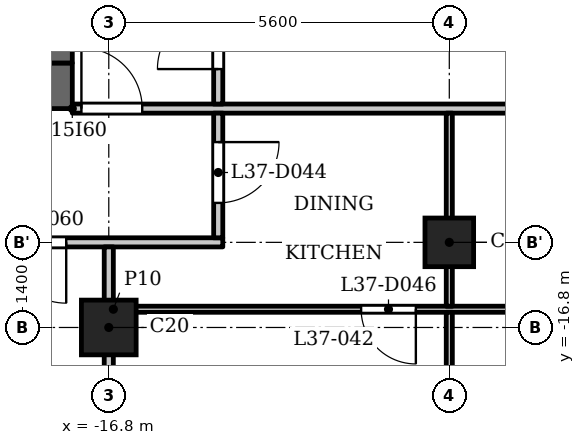
"""IFC4 building model, lengths in metres.
Left out: names, types, materials, properties, quantities, classifications, styles, units other than length and angle.
Written with IfcOpenShell. Run it as: python <this file> out.ifc"""

import sys

from ifc_helpers import new_model, si_unit, direction, frame, frame_2d, origin, origin_2d, place, context, subcontext, project, spatial, rectangle, extrude, element, fill, save


model = new_model("IFC4")
c1 = context("Model", 3, precision=1e-05, world=origin(), true_north=direction((0.0, 1.0)))
c2 = subcontext(c1, "Body", "Model", "MODEL_VIEW")
j1 = project(units=[si_unit("LENGTHUNIT", "METRE"), si_unit("PLANEANGLEUNIT", "RADIAN")], contexts=[c1])
p1 = place(None, origin())
s1 = spatial("IfcSite", under=j1, at=p1, CompositionType="ELEMENT")
p2 = place(p1, origin())
s2 = spatial("IfcBuilding", under=s1, at=p2, CompositionType="ELEMENT")
p3 = place(p2, frame((0.0, 0.0, 146.6)))
s3 = spatial("IfcBuildingStorey", under=s2, at=p3, CompositionType="ELEMENT", Elevation=146.6)
p4 = place(p3, frame((-16.8, -16.8, 0.0), z_axis=(0.0, 0.0, 1.0), x_axis=(1.0, 0.0, 0.0)))
e1 = element("IfcColumn", 1, at=p4, inside=s3, PredefinedType="COLUMN", context=c2, shape_type="SweptSolid", body=[
    extrude(rectangle(XDim=0.9, YDim=0.9, at=origin_2d()), origin(), (0.0, 0.0, 1.0), 3.5),
])
p5 = place(p3, frame((-11.2, -15.4, 0.0), z_axis=(0.0, 0.0, 1.0), x_axis=(1.0, 0.0, 0.0)))
e2 = element("IfcColumn", 2, at=p5, inside=s3, PredefinedType="COLUMN", context=c2, shape_type="SweptSolid", body=[
    extrude(rectangle(XDim=0.8, YDim=0.8, at=origin_2d()), origin(), (0.0, 0.0, 1.0), 3.5),
])
p6 = place(p3, frame((-17.4, -12.825, 0.0), z_axis=(0.0, 0.0, 1.0), x_axis=(-1.0, 0.0, 0.0)))
e3 = element("IfcWall", 3, at=p6, inside=s3, PredefinedType="SHEAR", context=c2, shape_type="SweptSolid", body=[
    extrude(rectangle(XDim=10.4, YDim=0.75, at=frame_2d((5.2, 0.0))), origin(), (0.0, 0.0, 1.0), 3.2),
])
p7 = place(p3, frame((-17.6, -12.45, 0.0), z_axis=(0.0, 0.0, 1.0), x_axis=(0.0, 1.0, 0.0)))
e4 = element("IfcWall", 4, at=p7, inside=s3, PredefinedType="SHEAR", context=c2, shape_type="SweptSolid", body=[
    extrude(rectangle(XDim=24.9, YDim=0.4, at=frame_2d((12.45, 0.0))), origin(), (0.0, 0.0, 1.0), 3.2),
])
p8 = place(p7, frame((6.325, 0.0, 0.0)))
e5 = element("IfcOpeningElement", 5, at=p8, cuts=e4, PredefinedType="OPENING", context=c2, shape_type="SweptSolid", body=[
    extrude(rectangle(XDim=0.9, YDim=2.1, at=frame_2d((0.45, 1.05))), frame((0.0, 0.21, 0.0), z_axis=(0.0, -1.0, 0.0), x_axis=(1.0, 0.0, 0.0)), (0.0, 0.0, 1.0), 0.42),
])
p9 = place(p7, frame((9.925, 0.0, 0.0)))
e6 = element("IfcOpeningElement", 6, at=p9, cuts=e4, PredefinedType="OPENING", context=c2, shape_type="SweptSolid", body=[
    extrude(rectangle(XDim=0.9, YDim=2.1, at=frame_2d((0.45, 1.05))), frame((0.0, 0.21, 0.0), z_axis=(0.0, -1.0, 0.0), x_axis=(1.0, 0.0, 0.0)), (0.0, 0.0, 1.0), 0.42),
])
p10 = place(p7, frame((15.6, 0.0, 0.0)))
e7 = element("IfcOpeningElement", 7, at=p10, cuts=e4, PredefinedType="OPENING", context=c2, shape_type="SweptSolid", body=[
    extrude(rectangle(XDim=1.1, YDim=2.1, at=frame_2d((0.55, 1.05))), frame((0.0, 0.21, 0.0), z_axis=(0.0, -1.0, 0.0), x_axis=(1.0, 0.0, 0.0)), (0.0, 0.0, 1.0), 0.42),
])
p11 = place(p7, frame((18.0, 0.0, 0.0)))
e8 = element("IfcOpeningElement", 8, at=p11, cuts=e4, PredefinedType="OPENING", context=c2, shape_type="SweptSolid", body=[
    extrude(rectangle(XDim=1.1, YDim=2.1, at=frame_2d((0.55, 1.05))), frame((0.0, 0.21, 0.0), z_axis=(0.0, -1.0, 0.0), x_axis=(1.0, 0.0, 0.0)), (0.0, 0.0, 1.0), 0.42),
])
p12 = place(p7, frame((23.025, 0.0, 0.0)))
e9 = element("IfcOpeningElement", 9, at=p12, cuts=e4, PredefinedType="OPENING", context=c2, shape_type="SweptSolid", body=[
    extrude(rectangle(XDim=1.1, YDim=2.1, at=frame_2d((0.55, 1.05))), frame((0.0, 0.21, 0.0), z_axis=(0.0, -1.0, 0.0), x_axis=(1.0, 0.0, 0.0)), (0.0, 0.0, 1.0), 0.42),
])
p13 = place(p7, frame((0.775, 0.0, 0.0)))
e10 = element("IfcOpeningElement", 10, at=p13, cuts=e4, PredefinedType="OPENING", context=c2, shape_type="SweptSolid", body=[
    extrude(rectangle(XDim=1.1, YDim=2.1, at=frame_2d((0.55, 1.05))), frame((0.0, 0.21, 0.0), z_axis=(0.0, -1.0, 0.0), x_axis=(1.0, 0.0, 0.0)), (0.0, 0.0, 1.0), 0.42),
])
p14 = place(p7, frame((12.925, 0.0, 0.0)))
e11 = element("IfcOpeningElement", 11, at=p14, cuts=e4, PredefinedType="OPENING", context=c2, shape_type="SweptSolid", body=[
    extrude(rectangle(XDim=1.8, YDim=2.1, at=frame_2d((0.9, 1.05))), frame((0.0, 0.21, 0.0), z_axis=(0.0, -1.0, 0.0), x_axis=(1.0, 0.0, 0.0)), (0.0, 0.0, 1.0), 0.42),
])
p15 = place(p3, frame((-16.725, -16.5, 0.0), z_axis=(0.0, 0.0, 1.0), x_axis=(1.0, 0.0, 0.0)))
e12 = element("IfcWall", 12, at=p15, inside=s3, PredefinedType="PARTITIONING", context=c2, shape_type="SweptSolid", body=[
    extrude(rectangle(XDim=33.45, YDim=0.1, at=frame_2d((16.725, 0.0))), origin(), (0.0, 0.0, 1.0), 3.2),
])
p16 = place(p15, frame((9.675, 0.0, 0.0)))
e13 = element("IfcOpeningElement", 13, at=p16, cuts=e12, PredefinedType="OPENING", context=c2, shape_type="SweptSolid", body=[
    extrude(rectangle(XDim=0.8, YDim=2.1, at=frame_2d((0.4, 1.05))), frame((0.0, 0.06, 0.0), z_axis=(0.0, -1.0, 0.0), x_axis=(1.0, 0.0, 0.0)), (0.0, 0.0, 1.0), 0.12),
])
p17 = place(p15, frame((4.075, 0.0, 0.0)))
e14 = element("IfcOpeningElement", 14, at=p17, cuts=e12, PredefinedType="OPENING", context=c2, shape_type="SweptSolid", body=[
    extrude(rectangle(XDim=0.9, YDim=2.1, at=frame_2d((0.45, 1.05))), frame((0.0, 0.06, 0.0), z_axis=(0.0, -1.0, 0.0), x_axis=(1.0, 0.0, 0.0)), (0.0, 0.0, 1.0), 0.12),
])
p18 = place(p15, frame((20.875, 0.0, 0.0)))
e15 = element("IfcOpeningElement", 15, at=p18, cuts=e12, PredefinedType="OPENING", context=c2, shape_type="SweptSolid", body=[
    extrude(rectangle(XDim=0.8, YDim=2.1, at=frame_2d((0.4, 1.05))), frame((0.0, 0.06, 0.0), z_axis=(0.0, -1.0, 0.0), x_axis=(1.0, 0.0, 0.0)), (0.0, 0.0, 1.0), 0.12),
])
p19 = place(p15, frame((15.275, 0.0, 0.0)))
e16 = element("IfcOpeningElement", 16, at=p19, cuts=e12, PredefinedType="OPENING", context=c2, shape_type="SweptSolid", body=[
    extrude(rectangle(XDim=0.9, YDim=2.1, at=frame_2d((0.45, 1.05))), frame((0.0, 0.06, 0.0), z_axis=(0.0, -1.0, 0.0), x_axis=(1.0, 0.0, 0.0)), (0.0, 0.0, 1.0), 0.12),
])
p20 = place(p15, frame((26.475, 0.0, 0.0)))
e17 = element("IfcOpeningElement", 17, at=p20, cuts=e12, PredefinedType="OPENING", context=c2, shape_type="SweptSolid", body=[
    extrude(rectangle(XDim=0.8, YDim=2.1, at=frame_2d((0.4, 1.05))), frame((0.0, 0.06, 0.0), z_axis=(0.0, -1.0, 0.0), x_axis=(1.0, 0.0, 0.0)), (0.0, 0.0, 1.0), 0.12),
])
p21 = place(p15, frame((30.575, 0.0, 0.0)))
e18 = element("IfcOpeningElement", 18, at=p21, cuts=e12, PredefinedType="OPENING", context=c2, shape_type="SweptSolid", body=[
    extrude(rectangle(XDim=0.9, YDim=2.1, at=frame_2d((0.45, 1.05))), frame((0.0, 0.06, 0.0), z_axis=(0.0, -1.0, 0.0), x_axis=(1.0, 0.0, 0.0)), (0.0, 0.0, 1.0), 0.12),
])
p22 = place(p3, frame((-27.484, -15.4, 0.0), z_axis=(0.0, 0.0, 1.0), x_axis=(1.0, 0.0, 0.0)))
e19 = element("IfcWall", 19, at=p22, inside=s3, PredefinedType="PARTITIONING", context=c2, shape_type="SweptSolid", body=[
    extrude(rectangle(XDim=12.559, YDim=0.15, at=frame_2d((6.279, 0.0))), origin(), (0.0, 0.0, 1.0), 3.2),
])
p23 = place(p22, frame((8.984, 0.0, 0.0)))
e20 = element("IfcOpeningElement", 20, at=p23, cuts=e19, PredefinedType="OPENING", context=c2, shape_type="SweptSolid", body=[
    extrude(rectangle(XDim=1.0, YDim=2.1, at=frame_2d((0.5, 1.05))), frame((0.0, 0.085, 0.0), z_axis=(0.0, -1.0, 0.0), x_axis=(1.0, 0.0, 0.0)), (0.0, 0.0, 1.0), 0.17),
])
p24 = place(p3, frame((-17.4, -13.2, 0.0), z_axis=(0.0, 0.0, 1.0), x_axis=(1.0, 0.0, 0.0)))
e21 = element("IfcWall", 21, at=p24, inside=s3, PredefinedType="PARTITIONING", context=c2, shape_type="SweptSolid", body=[
    extrude(rectangle(XDim=34.8, YDim=0.15, at=frame_2d((17.4, 0.0))), origin(), (0.0, 0.0, 1.0), 3.2),
])
p25 = place(p24, frame((0.15, 0.0, 0.0)))
e22 = element("IfcOpeningElement", 22, at=p25, cuts=e21, PredefinedType="OPENING", context=c2, shape_type="SweptSolid", body=[
    extrude(rectangle(XDim=1.0, YDim=2.1, at=frame_2d((0.5, 1.05))), frame((0.0, 0.085, 0.0), z_axis=(0.0, -1.0, 0.0), x_axis=(1.0, 0.0, 0.0)), (0.0, 0.0, 1.0), 0.17),
])
p26 = place(p24, frame((33.55, 0.0, 0.0)))
e23 = element("IfcOpeningElement", 23, at=p26, cuts=e21, PredefinedType="OPENING", context=c2, shape_type="SweptSolid", body=[
    extrude(rectangle(XDim=1.0, YDim=2.1, at=frame_2d((0.5, 1.05))), frame((0.0, 0.085, 0.0), z_axis=(0.0, -1.0, 0.0), x_axis=(1.0, 0.0, 0.0)), (0.0, 0.0, 1.0), 0.17),
])
p27 = place(p24, frame((15.7, 0.0, 0.0)))
e24 = element("IfcOpeningElement", 24, at=p27, cuts=e21, PredefinedType="OPENING", context=c2, shape_type="SweptSolid", body=[
    extrude(rectangle(XDim=1.0, YDim=2.1, at=frame_2d((0.5, 1.05))), frame((0.0, 0.085, 0.0), z_axis=(0.0, -1.0, 0.0), x_axis=(1.0, 0.0, 0.0)), (0.0, 0.0, 1.0), 0.17),
])
p28 = place(p3, frame((-16.8, -22.93, 0.0), z_axis=(0.0, 0.0, 1.0), x_axis=(0.0, 1.0, 0.0)))
e25 = element("IfcWall", 25, at=p28, inside=s3, PredefinedType="PARTITIONING", context=c2, shape_type="SweptSolid", body=[
    extrude(rectangle(XDim=7.455, YDim=0.15, at=frame_2d((3.728, 0.0))), origin(), (0.0, 0.0, 1.0), 3.2),
])
p29 = place(p3, frame((-15.0, -15.325, 0.0), z_axis=(0.0, 0.0, 1.0), x_axis=(0.0, 1.0, 0.0)))
e26 = element("IfcWall", 26, at=p29, inside=s3, PredefinedType="PARTITIONING", context=c2, shape_type="SweptSolid", body=[
    extrude(rectangle(XDim=2.05, YDim=0.15, at=frame_2d((1.025, 0.0))), origin(), (0.0, 0.0, 1.0), 3.2),
])
p30 = place(p29, frame((0.574, 0.0, 0.0)))
e27 = element("IfcOpeningElement", 27, at=p30, cuts=e26, PredefinedType="OPENING", context=c2, shape_type="SweptSolid", body=[
    extrude(rectangle(XDim=1.0, YDim=2.1, at=frame_2d((0.5, 1.05))), frame((0.0, 0.085, 0.0), z_axis=(0.0, -1.0, 0.0), x_axis=(1.0, 0.0, 0.0)), (0.0, 0.0, 1.0), 0.17),
])
p31 = place(p3, frame((-15.0, -13.125, 0.0), z_axis=(0.0, 0.0, 1.0), x_axis=(0.0, 1.0, 0.0)))
e28 = element("IfcWall", 28, at=p31, inside=s3, PredefinedType="PARTITIONING", context=c2, shape_type="SweptSolid", body=[
    extrude(rectangle(XDim=6.356, YDim=0.15, at=frame_2d((3.178, 0.0))), origin(), (0.0, 0.0, 1.0), 3.2),
])
p32 = place(p31, frame((0.575, 0.0, 0.0)))
e29 = element("IfcOpeningElement", 29, at=p32, cuts=e28, PredefinedType="OPENING", context=c2, shape_type="SweptSolid", body=[
    extrude(rectangle(XDim=1.0, YDim=2.1, at=frame_2d((0.5, 1.05))), frame((0.0, 0.085, 0.0), z_axis=(0.0, -1.0, 0.0), x_axis=(1.0, 0.0, 0.0)), (0.0, 0.0, 1.0), 0.17),
])
p33 = place(p3, frame((-11.2, -22.93, 0.0), z_axis=(0.0, 0.0, 1.0), x_axis=(0.0, 1.0, 0.0)))
e30 = element("IfcWall", 30, at=p33, inside=s3, PredefinedType="PARTITIONING", context=c2, shape_type="SweptSolid", body=[
    extrude(rectangle(XDim=6.38, YDim=0.1, at=frame_2d((3.19, 0.0))), origin(), (0.0, 0.0, 1.0), 3.2),
])
p34 = place(p33, frame((1.27, 0.0, 0.0)))
e31 = element("IfcOpeningElement", 31, at=p34, cuts=e30, PredefinedType="OPENING", context=c2, shape_type="SweptSolid", body=[
    extrude(rectangle(XDim=0.9, YDim=2.1, at=frame_2d((0.45, 1.05))), frame((0.0, 0.06, 0.0), z_axis=(0.0, -1.0, 0.0), x_axis=(1.0, 0.0, 0.0)), (0.0, 0.0, 1.0), 0.12),
])
p35 = place(p3, frame((-11.2, -16.45, 0.0), z_axis=(0.0, 0.0, 1.0), x_axis=(0.0, 1.0, 0.0)))
e32 = element("IfcWall", 32, at=p35, inside=s3, PredefinedType="PARTITIONING", context=c2, shape_type="SweptSolid", body=[
    extrude(rectangle(XDim=3.175, YDim=0.1, at=frame_2d((1.587, 0.0))), origin(), (0.0, 0.0, 1.0), 3.2),
])
p36 = place(p32, origin())
e33 = element("IfcDoor", 33, at=p36, inside=s3, OperationType="SINGLE_SWING_RIGHT", PredefinedType="DOOR", context=c2, shape_type="SweptSolid", body=[
    extrude(rectangle(XDim=1.0, YDim=2.1, at=frame_2d((0.5, 1.05))), frame((0.0, 0.025, 0.0), z_axis=(0.0, -1.0, 0.0), x_axis=(1.0, 0.0, 0.0)), (0.0, 0.0, 1.0), 0.05),
])
fill(e29, e33)
p37 = place(p25, origin())
e34 = element("IfcDoor", 34, at=p37, inside=s3, OperationType="SINGLE_SWING_RIGHT", PredefinedType="DOOR", context=c2, shape_type="SweptSolid", body=[
    extrude(rectangle(XDim=1.0, YDim=2.1, at=frame_2d((0.5, 1.05))), frame((0.0, 0.025, 0.0), z_axis=(0.0, -1.0, 0.0), x_axis=(1.0, 0.0, 0.0)), (0.0, 0.0, 1.0), 0.05),
])
fill(e22, e34)
p38 = place(p30, origin())
e35 = element("IfcDoor", 35, at=p38, inside=s3, OperationType="SINGLE_SWING_RIGHT", PredefinedType="DOOR", context=c2, shape_type="SweptSolid", body=[
    extrude(rectangle(XDim=1.0, YDim=2.1, at=frame_2d((0.5, 1.05))), frame((0.0, 0.025, 0.0), z_axis=(0.0, -1.0, 0.0), x_axis=(1.0, 0.0, 0.0)), (0.0, 0.0, 1.0), 0.05),
])
fill(e27, e35)
p39 = place(p17, origin())
e36 = element("IfcDoor", 36, at=p39, inside=s3, OperationType="SINGLE_SWING_RIGHT", PredefinedType="DOOR", context=c2, shape_type="SweptSolid", body=[
    extrude(rectangle(XDim=0.9, YDim=2.1, at=frame_2d((0.45, 1.05))), frame((0.0, 0.025, 0.0), z_axis=(0.0, -1.0, 0.0), x_axis=(1.0, 0.0, 0.0)), (0.0, 0.0, 1.0), 0.05),
])
fill(e14, e36)
p40 = place(p23, origin())
e37 = element("IfcDoor", 37, at=p40, inside=s3, OperationType="SINGLE_SWING_RIGHT", PredefinedType="DOOR", context=c2, shape_type="SweptSolid", body=[
    extrude(rectangle(XDim=1.0, YDim=2.1, at=frame_2d((0.5, 1.05))), frame((0.0, 0.025, 0.0), z_axis=(0.0, -1.0, 0.0), x_axis=(1.0, 0.0, 0.0)), (0.0, 0.0, 1.0), 0.05),
])
fill(e20, e37)
save(model, sys.argv[1])
